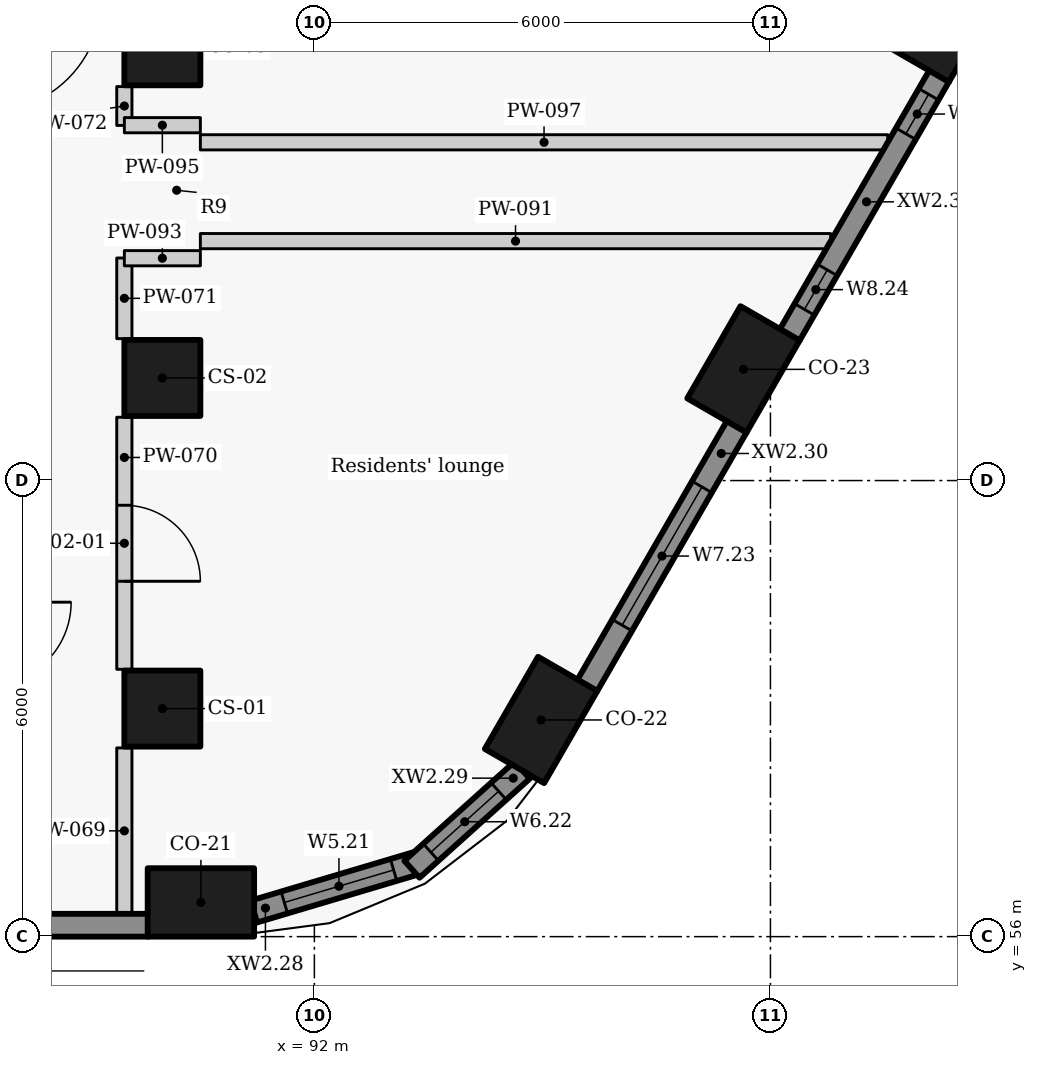
"""IFC4 building model, lengths in metres.
Left out: names, types, materials, properties, quantities, classifications, styles, units other than length and angle.
Written with IfcOpenShell. Run it as: python <this file> out.ifc"""

import sys

from ifc_helpers import new_model, si_unit, direction, frame, frame_2d, origin, origin_2d, place, context, subcontext, project, spatial, rectangle, extrude, element, fill, save


model = new_model("IFC4")
c1 = context("Model", 3, precision=1e-05, world=origin(), true_north=direction((0.0, 1.0)))
c2 = subcontext(c1, "Body", "Model", "MODEL_VIEW")
j1 = project(units=[si_unit("LENGTHUNIT", "METRE"), si_unit("PLANEANGLEUNIT", "RADIAN")], contexts=[c1])
p1 = place(None, origin())
s1 = spatial("IfcSite", under=j1, at=p1, CompositionType="ELEMENT")
p2 = place(p1, origin())
s2 = spatial("IfcBuilding", under=s1, at=p2, CompositionType="ELEMENT")
p3 = place(p2, frame((0.0, 0.0, 117.3)))
s3 = spatial("IfcBuildingStorey", under=s2, at=p3, CompositionType="ELEMENT", Elevation=117.3)
for number, where, z_axis, x_axis in (
    (1, (90.507, 56.45, 0.0), (0.0, 0.0, 1.0), (1.0, 0.0, 0.0)),
    (2, (94.982, 58.851, 0.0), (0.0, 0.0, 1.0), (0.5, 0.866, 0.0)),
    (3, (97.646, 63.463, 0.0), (0.0, 0.0, 1.0), (0.5, 0.866, 0.0)),
    (4, (100.308, 68.075, 0.0), (0.0, 0.0, 1.0), (0.5, 0.866, 0.0)),
):
    element("IfcColumn", number, at=place(p3, frame(where, z_axis=z_axis, x_axis=x_axis)), inside=s3, PredefinedType="COLUMN", context=c2, shape_type="SweptSolid", body=[
        extrude(rectangle(XDim=1.4, YDim=0.9, at=origin_2d()), origin(), (0.0, 0.0, 1.0), 3.3),
    ])
for number, where, z_axis, x_axis in (
    (5, (90.0, 59.0, 0.0), (0.0, 0.0, 1.0), (0.0, 1.0, 0.0)),
    (6, (90.0, 63.35, 0.0), (0.0, 0.0, 1.0), (0.0, 1.0, 0.0)),
    (7, (90.0, 67.7, 0.0), (0.0, 0.0, 1.0), (0.0, 1.0, 0.0)),
):
    element("IfcColumn", number, at=place(p3, frame(where, z_axis=z_axis, x_axis=x_axis)), inside=s3, PredefinedType="COLUMN", context=c2, shape_type="SweptSolid", body=[
        extrude(rectangle(XDim=1.0, YDim=1.0, at=origin_2d()), origin(), (0.0, 0.0, 1.0), 3.3),
    ])
p4 = place(p3, frame((69.871, 56.15, 0.0), z_axis=(0.0, 0.0, 1.0), x_axis=(1.0, 0.0, 0.0)))
e8 = element("IfcWall", 8, at=p4, inside=s3, PredefinedType="SOLIDWALL", context=c2, shape_type="SweptSolid", body=[
    extrude(rectangle(XDim=19.94, YDim=0.3, at=frame_2d((9.97, 0.0))), origin(), (0.0, 0.0, 1.0), 2.05),
])
p5 = place(p3, frame((91.203, 56.33, 0.0), z_axis=(0.0, 0.0, 1.0), x_axis=(0.95847736903, 0.285168604614, 0.0)))
e9 = element("IfcWall", 9, at=p5, inside=s3, PredefinedType="SOLIDWALL", context=c2, shape_type="SweptSolid", body=[
    extrude(rectangle(XDim=2.262, YDim=0.3, at=frame_2d((1.131, 0.0))), origin(), (0.0, 0.0, 1.0), 2.05),
])
p6 = place(p5, frame((0.419, 0.0, 0.9)))
e10 = element("IfcOpeningElement", 10, at=p6, cuts=e9, PredefinedType="OPENING", context=c2, shape_type="SweptSolid", body=[
    extrude(rectangle(XDim=1.5, YDim=1.1, at=frame_2d((0.75, 0.55))), frame((0.0, 0.16, 0.0), z_axis=(0.0, -1.0, 0.0), x_axis=(1.0, 0.0, 0.0)), (0.0, 0.0, 1.0), 0.32),
])
p7 = place(p3, frame((93.283, 56.887, 0.0), z_axis=(0.0, 0.0, 1.0), x_axis=(0.743785734967, 0.668418117992, 0.0)))
e11 = element("IfcWall", 11, at=p7, inside=s3, PredefinedType="SOLIDWALL", context=c2, shape_type="SweptSolid", body=[
    extrude(rectangle(XDim=1.95, YDim=0.3, at=frame_2d((0.975, 0.0))), origin(), (0.0, 0.0, 1.0), 2.05),
])
p8 = place(p7, frame((0.335, 0.0, 0.9)))
e12 = element("IfcOpeningElement", 12, at=p8, cuts=e11, PredefinedType="OPENING", context=c2, shape_type="SweptSolid", body=[
    extrude(rectangle(XDim=1.2, YDim=1.1, at=frame_2d((0.6, 0.55))), frame((0.0, 0.16, 0.0), z_axis=(0.0, -1.0, 0.0), x_axis=(1.0, 0.0, 0.0)), (0.0, 0.0, 1.0), 0.32),
])
p9 = place(p3, frame((95.59, 59.303, 0.0), z_axis=(0.0, 0.0, 1.0), x_axis=(0.500003583557, 0.866023334807, 0.0)))
e13 = element("IfcWall", 13, at=p9, inside=s3, PredefinedType="SOLIDWALL", context=c2, shape_type="SweptSolid", body=[
    extrude(rectangle(XDim=3.934, YDim=0.3, at=frame_2d((1.967, 0.0))), origin(), (0.0, 0.0, 1.0), 2.05),
])
p10 = place(p9, frame((0.917, 0.0, 0.9)))
e14 = element("IfcOpeningElement", 14, at=p10, cuts=e13, PredefinedType="OPENING", context=c2, shape_type="SweptSolid", body=[
    extrude(rectangle(XDim=2.1, YDim=1.1, at=frame_2d((1.05, 0.55))), frame((0.0, 0.16, 0.0), z_axis=(0.0, -1.0, 0.0), x_axis=(1.0, 0.0, 0.0)), (0.0, 0.0, 1.0), 0.32),
])
p11 = place(p3, frame((98.253, 63.916, 0.0), z_axis=(0.0, 0.0, 1.0), x_axis=(0.499957037901, 0.866050206543, 0.0)))
e15 = element("IfcWall", 15, at=p11, inside=s3, PredefinedType="SOLIDWALL", context=c2, shape_type="SweptSolid", body=[
    extrude(rectangle(XDim=3.934, YDim=0.3, at=frame_2d((1.967, 0.0))), origin(), (0.0, 0.0, 1.0), 2.05),
])
p12 = place(p11, frame((0.389, 0.0, 0.9)))
e16 = element("IfcOpeningElement", 16, at=p12, cuts=e15, PredefinedType="OPENING", context=c2, shape_type="SweptSolid", body=[
    extrude(rectangle(XDim=0.6, YDim=1.1, at=frame_2d((0.3, 0.55))), frame((0.0, 0.16, 0.0), z_axis=(0.0, -1.0, 0.0), x_axis=(1.0, 0.0, 0.0)), (0.0, 0.0, 1.0), 0.32),
])
p13 = place(p11, frame((3.056, 0.0, 0.9)))
e17 = element("IfcOpeningElement", 17, at=p13, cuts=e15, PredefinedType="OPENING", context=c2, shape_type="SweptSolid", body=[
    extrude(rectangle(XDim=0.6, YDim=1.1, at=frame_2d((0.3, 0.55))), frame((0.0, 0.16, 0.0), z_axis=(0.0, -1.0, 0.0), x_axis=(1.0, 0.0, 0.0)), (0.0, 0.0, 1.0), 0.32),
])
p14 = place(p3, frame((89.5, 56.3, 0.0), z_axis=(0.0, 0.0, 1.0), x_axis=(0.0, 1.0, 0.0)))
e18 = element("IfcWall", 18, at=p14, inside=s3, PredefinedType="PARTITIONING", context=c2, shape_type="SweptSolid", body=[
    extrude(rectangle(XDim=2.183, YDim=0.2, at=frame_2d((1.091, 0.0))), origin(), (0.0, 0.0, 1.0), 2.95),
])
p15 = place(p3, frame((89.5, 62.833, 0.0), z_axis=(0.0, 0.0, 1.0), x_axis=(0.0, -1.0, 0.0)))
e19 = element("IfcWall", 19, at=p15, inside=s3, PredefinedType="PARTITIONING", context=c2, shape_type="SweptSolid", body=[
    extrude(rectangle(XDim=3.316, YDim=0.2, at=frame_2d((1.658, 0.0))), origin(), (0.0, 0.0, 1.0), 2.95),
])
p16 = place(p15, frame((1.158, 0.0, 0.0)))
e20 = element("IfcOpeningElement", 20, at=p16, cuts=e19, PredefinedType="OPENING", context=c2, shape_type="SweptSolid", body=[
    extrude(rectangle(XDim=1.0, YDim=2.1, at=frame_2d((0.5, 1.05))), frame((0.0, 0.11, 0.0), z_axis=(0.0, -1.0, 0.0), x_axis=(1.0, 0.0, 0.0)), (0.0, 0.0, 1.0), 0.22),
])
p17 = place(p3, frame((89.5, 63.867, 0.0), z_axis=(0.0, 0.0, 1.0), x_axis=(0.0, 1.0, 0.0)))
e21 = element("IfcWall", 21, at=p17, inside=s3, PredefinedType="PARTITIONING", context=c2, shape_type="SweptSolid", body=[
    extrude(rectangle(XDim=1.061, YDim=0.2, at=frame_2d((0.531, 0.0))), origin(), (0.0, 0.0, 1.0), 2.95),
])
p18 = place(p3, frame((89.5, 66.672, 0.0), z_axis=(0.0, 0.0, 1.0), x_axis=(0.0, 1.0, 0.0)))
e22 = element("IfcWall", 22, at=p18, inside=s3, PredefinedType="PARTITIONING", context=c2, shape_type="SweptSolid", body=[
    extrude(rectangle(XDim=0.511, YDim=0.2, at=frame_2d((0.255, 0.0))), origin(), (0.0, 0.0, 1.0), 2.95),
])
p19 = place(p3, frame((90.5, 65.15, 0.0), z_axis=(0.0, 0.0, 1.0), x_axis=(1.0, 0.0, 0.0)))
e23 = element("IfcWall", 23, at=p19, inside=s3, PredefinedType="PARTITIONING", context=c2, shape_type="SweptSolid", body=[
    extrude(rectangle(XDim=8.293, YDim=0.2, at=frame_2d((4.146, 0.0))), origin(), (0.0, 0.0, 1.0), 2.03),
])
for number, where, z_axis, x_axis in (
    (24, (89.5, 64.925, 0.0), (0.0, 0.0, 1.0), (1.0, 0.0, 0.0)),
    (25, (89.5, 66.675, 0.0), (0.0, 0.0, 1.0), (1.0, 0.0, 0.0)),
):
    element("IfcWall", number, at=place(p3, frame(where, z_axis=z_axis, x_axis=x_axis)), inside=s3, PredefinedType="PARTITIONING", context=c2, shape_type="SweptSolid", body=[
        extrude(rectangle(XDim=1.0, YDim=0.2, at=frame_2d((0.5, 0.0))), origin(), (0.0, 0.0, 1.0), 2.43),
    ])
p20 = place(p3, frame((90.5, 66.45, 0.0), z_axis=(0.0, 0.0, 1.0), x_axis=(1.0, 0.0, 0.0)))
e26 = element("IfcWall", 26, at=p20, inside=s3, PredefinedType="PARTITIONING", context=c2, shape_type="SweptSolid", body=[
    extrude(rectangle(XDim=9.043, YDim=0.2, at=frame_2d((4.521, 0.0))), origin(), (0.0, 0.0, 1.0), 2.03),
])
p21 = place(p6, origin())
e27 = element("IfcWindow", 27, at=p21, inside=s3, PartitioningType="SINGLE_PANEL", PredefinedType="WINDOW", context=c2, shape_type="SweptSolid", body=[
    extrude(rectangle(XDim=1.5, YDim=1.1, at=frame_2d((0.75, 0.55))), frame((0.0, 0.03, 0.0), z_axis=(0.0, -1.0, 0.0), x_axis=(1.0, 0.0, 0.0)), (0.0, 0.0, 1.0), 0.06),
])
fill(e10, e27)
p22 = place(p8, origin())
e28 = element("IfcWindow", 28, at=p22, inside=s3, PartitioningType="SINGLE_PANEL", PredefinedType="WINDOW", context=c2, shape_type="SweptSolid", body=[
    extrude(rectangle(XDim=1.2, YDim=1.1, at=frame_2d((0.6, 0.55))), frame((0.0, 0.03, 0.0), z_axis=(0.0, -1.0, 0.0), x_axis=(1.0, 0.0, 0.0)), (0.0, 0.0, 1.0), 0.06),
])
fill(e12, e28)
p23 = place(p10, origin())
e29 = element("IfcWindow", 29, at=p23, inside=s3, PartitioningType="SINGLE_PANEL", PredefinedType="WINDOW", context=c2, shape_type="SweptSolid", body=[
    extrude(rectangle(XDim=2.1, YDim=1.1, at=frame_2d((1.05, 0.55))), frame((0.0, 0.03, 0.0), z_axis=(0.0, -1.0, 0.0), x_axis=(1.0, 0.0, 0.0)), (0.0, 0.0, 1.0), 0.06),
])
fill(e14, e29)
p24 = place(p12, origin())
e30 = element("IfcWindow", 30, at=p24, inside=s3, PartitioningType="SINGLE_PANEL", PredefinedType="WINDOW", context=c2, shape_type="SweptSolid", body=[
    extrude(rectangle(XDim=0.6, YDim=1.1, at=frame_2d((0.3, 0.55))), frame((0.0, 0.03, 0.0), z_axis=(0.0, -1.0, 0.0), x_axis=(1.0, 0.0, 0.0)), (0.0, 0.0, 1.0), 0.06),
])
fill(e16, e30)
p25 = place(p13, origin())
e31 = element("IfcWindow", 31, at=p25, inside=s3, PartitioningType="SINGLE_PANEL", PredefinedType="WINDOW", context=c2, shape_type="SweptSolid", body=[
    extrude(rectangle(XDim=0.6, YDim=1.1, at=frame_2d((0.3, 0.55))), frame((0.0, 0.03, 0.0), z_axis=(0.0, -1.0, 0.0), x_axis=(1.0, 0.0, 0.0)), (0.0, 0.0, 1.0), 0.06),
])
fill(e17, e31)
p26 = place(p16, origin())
e32 = element("IfcDoor", 32, at=p26, inside=s3, OperationType="SINGLE_SWING_RIGHT", PredefinedType="DOOR", context=c2, shape_type="SweptSolid", body=[
    extrude(rectangle(XDim=1.0, YDim=2.1, at=frame_2d((0.5, 1.05))), frame((0.0, 0.025, 0.0), z_axis=(0.0, -1.0, 0.0), x_axis=(1.0, 0.0, 0.0)), (0.0, 0.0, 1.0), 0.05),
])
fill(e20, e32)
save(model, sys.argv[1])
